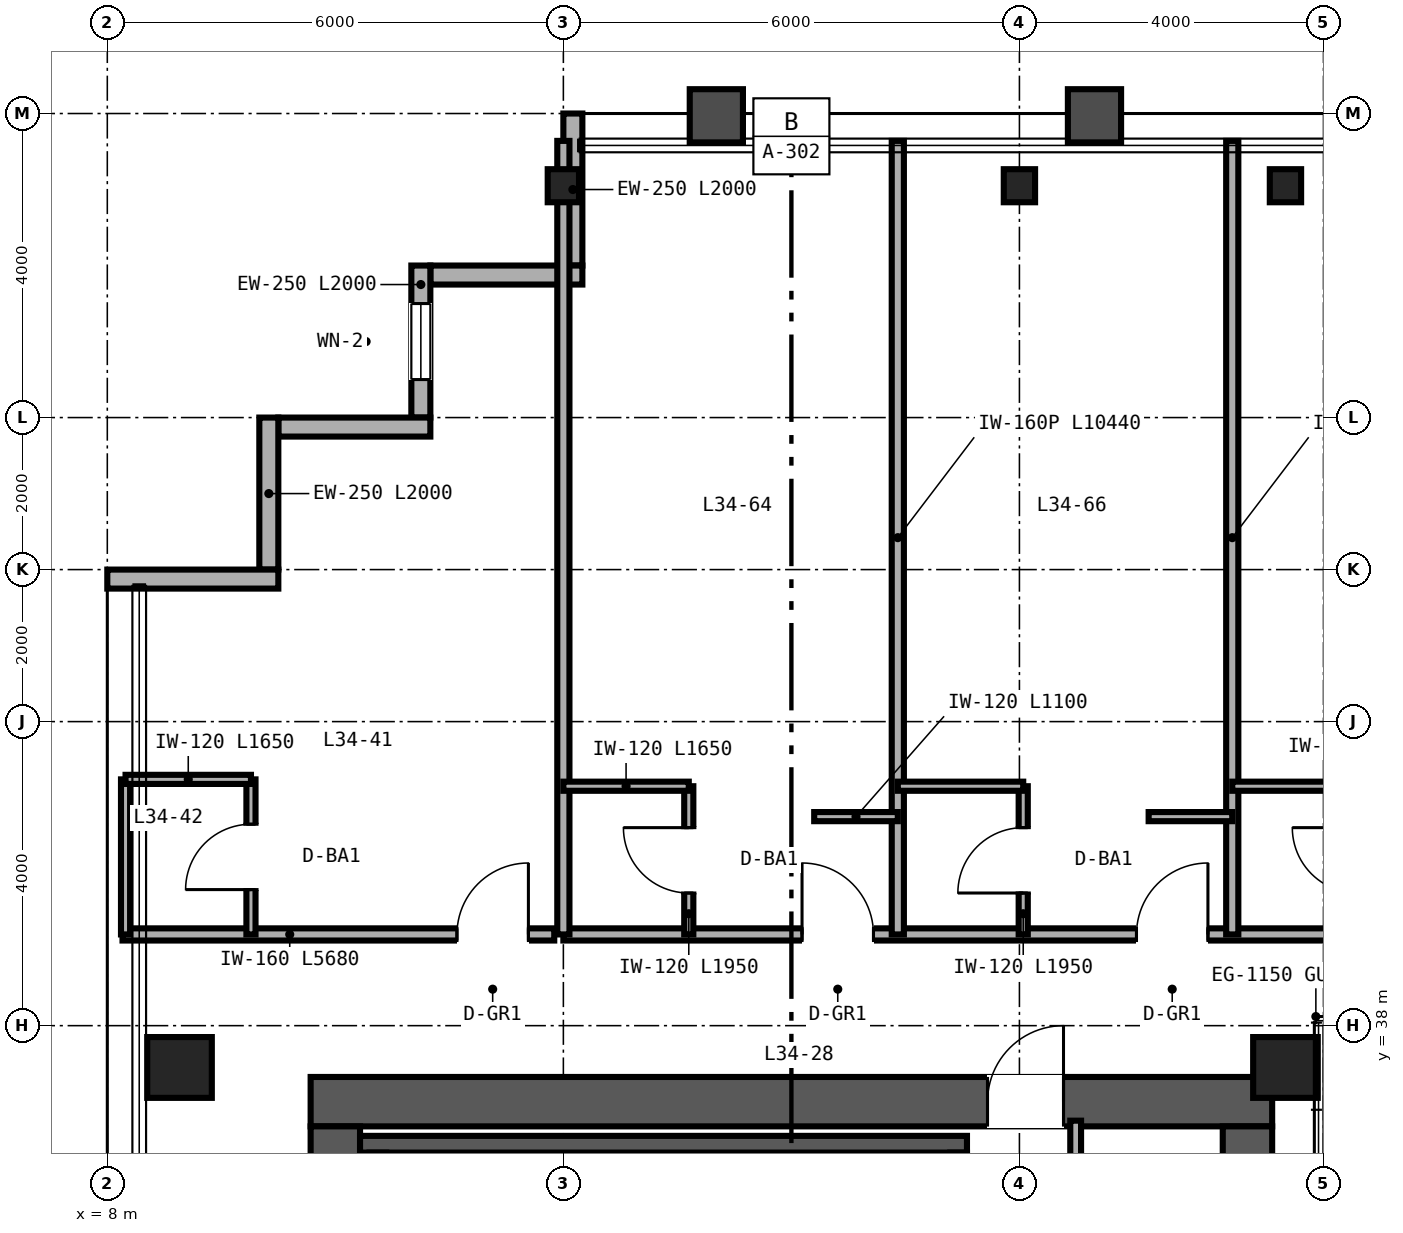
"""IFC4 building model, lengths in metres.
Left out: names, types, materials, properties, quantities, classifications, styles, units other than length and angle.
Written with IfcOpenShell. Run it as: python <this file> out.ifc"""

import sys

from ifc_helpers import new_model, si_unit, direction, frame, frame_2d, origin, origin_2d, place, context, subcontext, project, spatial, rectangle, hollow_rectangle, i_section, extrude, source, transform, mapped, element, fill, save


model = new_model("IFC4")
c1 = context("Model", 3, precision=1e-05, world=origin(), true_north=direction((0.0, 1.0)))
c2 = subcontext(c1, "Body", "Model", "MODEL_VIEW")
j1 = project(units=[si_unit("LENGTHUNIT", "METRE"), si_unit("PLANEANGLEUNIT", "RADIAN")], contexts=[c1])
p1 = place(None, origin())
s1 = spatial("IfcSite", under=j1, at=p1, CompositionType="ELEMENT")
p2 = place(p1, origin())
s2 = spatial("IfcBuilding", under=s1, at=p2, CompositionType="ELEMENT")
p3 = place(p2, frame((0.0, 0.0, 136.8)))
s3 = spatial("IfcBuildingStorey", under=s2, at=p3, CompositionType="ELEMENT", Elevation=136.8)
p4 = place(p3, frame((10.675, 37.0, 0.0), z_axis=(0.0, 0.0, 1.0), x_axis=(1.0, 0.0, 0.0)))
e1 = element("IfcWall", 1, at=p4, inside=s3, PredefinedType="SHEAR", context=c2, shape_type="SweptSolid", body=[
    extrude(rectangle(XDim=12.65, YDim=0.65, at=frame_2d((6.325, 0.0))), origin(), (0.0, 0.0, 1.0), 3.36),
])
p5 = place(p4, frame((8.905, 0.0, 0.0)))
e2 = element("IfcOpeningElement", 2, at=p5, cuts=e1, PredefinedType="OPENING", context=c2, shape_type="SweptSolid", body=[
    extrude(rectangle(XDim=1.0, YDim=2.15, at=frame_2d((0.5, 1.075))), frame((0.0, 0.335, 0.0), z_axis=(0.0, -1.0, 0.0), x_axis=(1.0, 0.0, 0.0)), (0.0, 0.0, 1.0), 0.67),
])
for number, where, z_axis, x_axis in (
    (3, (11.0, 15.325, 0.0), (0.0, 0.0, 1.0), (0.0, 1.0, 0.0)),
    (4, (23.0, 15.325, 0.0), (0.0, 0.0, 1.0), (0.0, 1.0, 0.0)),
):
    element("IfcWall", number, at=place(p3, frame(where, z_axis=z_axis, x_axis=x_axis)), inside=s3, PredefinedType="SHEAR", context=c2, shape_type="SweptSolid", body=[
        extrude(rectangle(XDim=21.35, YDim=0.65, at=frame_2d((10.675, 0.0))), origin(), (0.0, 0.0, 1.0), 3.36),
    ])
p6 = place(p3, frame((11.325, 36.44, 0.0), z_axis=(0.0, 0.0, 1.0), x_axis=(1.0, 0.0, 0.0)))
e5 = element("IfcWall", 5, at=p6, inside=s3, PredefinedType="SHEAR", context=c2, shape_type="SweptSolid", body=[
    extrude(rectangle(XDim=7.985, YDim=0.22, at=frame_2d((3.993, 0.0))), origin(), (0.0, 0.0, 1.0), 3.4),
])
for number, where, z_axis, x_axis in (
    (6, (11.56, 33.05, 0.0), (0.0, 0.0, 1.0), (0.0, 1.0, 0.0)),
    (7, (19.2, 33.05, 0.0), (0.0, 0.0, 1.0), (0.0, 1.0, 0.0)),
):
    element("IfcWall", number, at=place(p3, frame(where, z_axis=z_axis, x_axis=x_axis)), inside=s3, PredefinedType="SHEAR", context=c2, shape_type="SweptSolid", body=[
        extrude(rectangle(XDim=3.28, YDim=0.22, at=frame_2d((1.64, 0.0))), origin(), (0.0, 0.0, 1.0), 3.4),
    ])
m1 = source(origin(), c2, "Body", "SweptSolid", [
    extrude(hollow_rectangle(XDim=0.85, YDim=0.8, WallThickness=0.032, at=origin_2d()), origin(), (0.0, 0.0, 1.0), 3.36),
])
for number, where, z_axis, x_axis in (
    (8, (8.95, 37.45, 0.0), (0.0, 0.0, 1.0), (1.0, 0.0, 0.0)),
    (9, (23.5, 37.45, 0.0), (0.0, 0.0, 1.0), (1.0, 0.0, 0.0)),
):
    element("IfcColumn", number, at=place(p3, frame(where, z_axis=z_axis, x_axis=x_axis)), inside=s3, PredefinedType="COLUMN", context=c2, shape_type="MappedRepresentation", body=[
        mapped(m1, transform((0.0, 0.0, 0.0), scale=1.0)),
    ])
m2 = source(origin(), c2, "Body", "SweptSolid", [
    extrude(i_section(OverallWidth=0.412, OverallDepth=0.435, WebThickness=0.036, FlangeThickness=0.057, FilletRadius=0.025, at=origin_2d()), origin(), (0.0, 0.0, 1.0), 3.36),
])
for number, where, z_axis, x_axis in (
    (10, (14.0, 49.05, 0.0), (0.0, 0.0, 1.0), (1.0, 0.0, 0.0)),
    (11, (20.0, 49.05, 0.0), (0.0, 0.0, 1.0), (1.0, 0.0, 0.0)),
    (12, (23.5, 49.05, 0.0), (0.0, 0.0, 1.0), (1.0, 0.0, 0.0)),
):
    element("IfcColumn", number, at=place(p3, frame(where, z_axis=z_axis, x_axis=x_axis)), inside=s3, PredefinedType="COLUMN", context=c2, shape_type="MappedRepresentation", body=[
        mapped(m2, transform((0.0, 0.0, 0.0), scale=1.0)),
    ])
p7 = place(p3, frame((14.125, 50.0, 0.0), z_axis=(0.0, 0.0, 1.0), x_axis=(0.0, -1.0, 0.0)))
e13 = element("IfcWall", 13, at=p7, inside=s3, PredefinedType="SOLIDWALL", context=c2, shape_type="SweptSolid", body=[
    extrude(rectangle(XDim=2.0, YDim=0.25, at=frame_2d((1.0, 0.0))), origin(), (0.0, 0.0, 1.0), 2.667),
])
p8 = place(p3, frame((14.25, 47.875, 0.0), z_axis=(0.0, 0.0, 1.0), x_axis=(-1.0, 0.0, 0.0)))
e14 = element("IfcWall", 14, at=p8, inside=s3, PredefinedType="SOLIDWALL", context=c2, shape_type="SweptSolid", body=[
    extrude(rectangle(XDim=2.0, YDim=0.25, at=frame_2d((1.0, 0.0))), origin(), (0.0, 0.0, 1.0), 3.36),
])
p9 = place(p3, frame((12.125, 48.0, 0.0), z_axis=(0.0, 0.0, 1.0), x_axis=(0.0, -1.0, 0.0)))
e15 = element("IfcWall", 15, at=p9, inside=s3, PredefinedType="SOLIDWALL", context=c2, shape_type="SweptSolid", body=[
    extrude(rectangle(XDim=2.0, YDim=0.25, at=frame_2d((1.0, 0.0))), origin(), (0.0, 0.0, 1.0), 3.36),
])
p10 = place(p9, frame((0.5, 0.0, 0.85)))
e16 = element("IfcOpeningElement", 16, at=p10, cuts=e15, PredefinedType="OPENING", context=c2, shape_type="SweptSolid", body=[
    extrude(rectangle(XDim=1.0, YDim=1.9, at=frame_2d((0.5, 0.95))), frame((0.0, 0.135, 0.0), z_axis=(0.0, -1.0, 0.0), x_axis=(1.0, 0.0, 0.0)), (0.0, 0.0, 1.0), 0.27),
])
for number, where, z_axis, x_axis in (
    (17, (12.25, 45.875, 0.0), (0.0, 0.0, 1.0), (-1.0, 0.0, 0.0)),
    (18, (10.125, 46.0, 0.0), (0.0, 0.0, 1.0), (0.0, -1.0, 0.0)),
):
    element("IfcWall", number, at=place(p3, frame(where, z_axis=z_axis, x_axis=x_axis)), inside=s3, PredefinedType="SOLIDWALL", context=c2, shape_type="SweptSolid", body=[
        extrude(rectangle(XDim=2.0, YDim=0.25, at=frame_2d((1.0, 0.0))), origin(), (0.0, 0.0, 1.0), 3.36),
    ])
p11 = place(p3, frame((10.25, 43.875, 0.0), z_axis=(0.0, 0.0, 1.0), x_axis=(-1.0, 0.0, 0.0)))
e19 = element("IfcWall", 19, at=p11, inside=s3, PredefinedType="SOLIDWALL", context=c2, shape_type="SweptSolid", body=[
    extrude(rectangle(XDim=2.25, YDim=0.25, at=frame_2d((1.125, 0.0))), origin(), (0.0, 0.0, 1.0), 3.36),
])
p12 = place(p3, frame((20.74, 34.92, 0.0), z_axis=(0.0, 0.0, 1.0), x_axis=(0.0, 1.0, 0.0)))
e20 = element("IfcWall", 20, at=p12, inside=s3, PredefinedType="PARTITIONING", context=c2, shape_type="SweptSolid", body=[
    extrude(rectangle(XDim=1.83, YDim=0.142, at=frame_2d((0.915, 0.0))), origin(), (0.0, 0.0, 1.0), 3.36),
])
p13 = place(p3, frame((8.2, 39.2, 0.0), z_axis=(0.0, 0.0, 1.0), x_axis=(1.0, 0.0, 0.0)))
e21 = element("IfcWall", 21, at=p13, inside=s3, PredefinedType="PARTITIONING", context=c2, shape_type="SweptSolid", body=[
    extrude(rectangle(XDim=5.68, YDim=0.16, at=frame_2d((2.84, 0.0))), origin(), (0.0, 0.0, 1.0), 3.36),
])
p14 = place(p13, frame((4.4, 0.0, 0.0)))
e22 = element("IfcOpeningElement", 22, at=p14, cuts=e21, PredefinedType="OPENING", context=c2, shape_type="SweptSolid", body=[
    extrude(rectangle(XDim=0.94, YDim=2.15, at=frame_2d((0.47, 1.075))), frame((0.0, 0.09, 0.0), z_axis=(0.0, -1.0, 0.0), x_axis=(1.0, 0.0, 0.0)), (0.0, 0.0, 1.0), 0.18),
])
p15 = place(p3, frame((9.89, 39.2, 0.0), z_axis=(0.0, 0.0, 1.0), x_axis=(0.0, 1.0, 0.0)))
e23 = element("IfcWall", 23, at=p15, inside=s3, PredefinedType="PARTITIONING", context=c2, shape_type="SweptSolid", body=[
    extrude(rectangle(XDim=2.04, YDim=0.12, at=frame_2d((1.02, 0.0))), origin(), (0.0, 0.0, 1.0), 3.36),
])
p16 = place(p15, frame((0.59, 0.0, 0.0)))
e24 = element("IfcOpeningElement", 24, at=p16, cuts=e23, PredefinedType="OPENING", context=c2, shape_type="SweptSolid", body=[
    extrude(rectangle(XDim=0.86, YDim=2.1, at=frame_2d((0.43, 1.05))), frame((0.0, 0.07, 0.0), z_axis=(0.0, -1.0, 0.0), x_axis=(1.0, 0.0, 0.0)), (0.0, 0.0, 1.0), 0.14),
])
p17 = place(p3, frame((8.24, 39.2, 0.0), z_axis=(0.0, 0.0, 1.0), x_axis=(0.0, 1.0, 0.0)))
e25 = element("IfcWall", 25, at=p17, inside=s3, PredefinedType="PARTITIONING", context=c2, shape_type="SweptSolid", body=[
    extrude(rectangle(XDim=2.04, YDim=0.12, at=frame_2d((1.02, 0.0))), origin(), (0.0, 0.0, 1.0), 3.36),
])
p18 = place(p3, frame((8.24, 41.24, 0.0), z_axis=(0.0, 0.0, 1.0), x_axis=(1.0, 0.0, 0.0)))
e26 = element("IfcWall", 26, at=p18, inside=s3, PredefinedType="PARTITIONING", context=c2, shape_type="SweptSolid", body=[
    extrude(rectangle(XDim=1.65, YDim=0.12, at=frame_2d((0.825, 0.0))), origin(), (0.0, 0.0, 1.0), 3.36),
])
p19 = place(p3, frame((14.0, 39.2, 0.0), z_axis=(0.0, 0.0, 1.0), x_axis=(1.0, 0.0, 0.0)))
e27 = element("IfcWall", 27, at=p19, inside=s3, PredefinedType="PARTITIONING", context=c2, shape_type="SweptSolid", body=[
    extrude(rectangle(XDim=36.0, YDim=0.16, at=frame_2d((18.0, 0.0))), origin(), (0.0, 0.0, 1.0), 2.581),
])
p20 = place(p19, frame((3.14, 0.0, 0.0)))
e28 = element("IfcOpeningElement", 28, at=p20, cuts=e27, PredefinedType="OPENING", context=c2, shape_type="SweptSolid", body=[
    extrude(rectangle(XDim=0.94, YDim=2.15, at=frame_2d((0.47, 1.075))), frame((0.0, 0.09, 0.0), z_axis=(0.0, -1.0, 0.0), x_axis=(1.0, 0.0, 0.0)), (0.0, 0.0, 1.0), 0.18),
])
p21 = place(p19, frame((7.54, 0.0, 0.0)))
e29 = element("IfcOpeningElement", 29, at=p21, cuts=e27, PredefinedType="OPENING", context=c2, shape_type="SweptSolid", body=[
    extrude(rectangle(XDim=0.94, YDim=2.15, at=frame_2d((0.47, 1.075))), frame((0.0, 0.09, 0.0), z_axis=(0.0, -1.0, 0.0), x_axis=(1.0, 0.0, 0.0)), (0.0, 0.0, 1.0), 0.18),
])
p22 = place(p19, frame((11.94, 0.0, 0.0)))
e30 = element("IfcOpeningElement", 30, at=p22, cuts=e27, PredefinedType="OPENING", context=c2, shape_type="SweptSolid", body=[
    extrude(rectangle(XDim=0.94, YDim=2.15, at=frame_2d((0.47, 1.075))), frame((0.0, 0.09, 0.0), z_axis=(0.0, -1.0, 0.0), x_axis=(1.0, 0.0, 0.0)), (0.0, 0.0, 1.0), 0.18),
])
p23 = place(p19, frame((15.02, 0.0, 0.0)))
e31 = element("IfcOpeningElement", 31, at=p23, cuts=e27, PredefinedType="OPENING", context=c2, shape_type="SweptSolid", body=[
    extrude(rectangle(XDim=0.96, YDim=2.15, at=frame_2d((0.48, 1.075))), frame((0.0, 0.09, 0.0), z_axis=(0.0, -1.0, 0.0), x_axis=(1.0, 0.0, 0.0)), (0.0, 0.0, 1.0), 0.18),
])
p24 = place(p19, frame((21.14, 0.0, 0.0)))
e32 = element("IfcOpeningElement", 32, at=p24, cuts=e27, PredefinedType="OPENING", context=c2, shape_type="SweptSolid", body=[
    extrude(rectangle(XDim=0.94, YDim=2.15, at=frame_2d((0.47, 1.075))), frame((0.0, 0.09, 0.0), z_axis=(0.0, -1.0, 0.0), x_axis=(1.0, 0.0, 0.0)), (0.0, 0.0, 1.0), 0.18),
])
p25 = place(p19, frame((24.79, 0.0, 0.0)))
e33 = element("IfcOpeningElement", 33, at=p25, cuts=e27, PredefinedType="OPENING", context=c2, shape_type="SweptSolid", body=[
    extrude(rectangle(XDim=0.94, YDim=2.15, at=frame_2d((0.47, 1.075))), frame((0.0, 0.09, 0.0), z_axis=(0.0, -1.0, 0.0), x_axis=(1.0, 0.0, 0.0)), (0.0, 0.0, 1.0), 0.18),
])
p26 = place(p19, frame((30.24, 0.0, 0.0)))
e34 = element("IfcOpeningElement", 34, at=p26, cuts=e27, PredefinedType="OPENING", context=c2, shape_type="SweptSolid", body=[
    extrude(rectangle(XDim=0.94, YDim=2.15, at=frame_2d((0.47, 1.075))), frame((0.0, 0.09, 0.0), z_axis=(0.0, -1.0, 0.0), x_axis=(1.0, 0.0, 0.0)), (0.0, 0.0, 1.0), 0.18),
])
p27 = place(p19, frame((34.74, 0.0, 0.0)))
e35 = element("IfcOpeningElement", 35, at=p27, cuts=e27, PredefinedType="OPENING", context=c2, shape_type="SweptSolid", body=[
    extrude(rectangle(XDim=0.94, YDim=2.15, at=frame_2d((0.47, 1.075))), frame((0.0, 0.09, 0.0), z_axis=(0.0, -1.0, 0.0), x_axis=(1.0, 0.0, 0.0)), (0.0, 0.0, 1.0), 0.18),
])
for number, where, z_axis, x_axis in (
    (36, (14.0, 39.2, 0.0), (0.0, 0.0, 1.0), (0.0, 1.0, 0.0)),
    (37, (18.4, 39.2, 0.0), (0.0, 0.0, 1.0), (0.0, 1.0, 0.0)),
):
    element("IfcWall", number, at=place(p3, frame(where, z_axis=z_axis, x_axis=x_axis)), inside=s3, PredefinedType="PARTITIONING", context=c2, shape_type="SweptSolid", body=[
        extrude(rectangle(XDim=10.44, YDim=0.16, at=frame_2d((5.22, 0.0))), origin(), (0.0, 0.0, 1.0), 2.667),
    ])
p28 = place(p3, frame((15.65, 39.2, 0.0), z_axis=(0.0, 0.0, 1.0), x_axis=(0.0, 1.0, 0.0)))
e38 = element("IfcWall", 38, at=p28, inside=s3, PredefinedType="PARTITIONING", context=c2, shape_type="SweptSolid", body=[
    extrude(rectangle(XDim=1.95, YDim=0.12, at=frame_2d((0.975, 0.0))), origin(), (0.0, 0.0, 1.0), 3.36),
])
p29 = place(p28, frame((0.545, 0.0, 0.0)))
e39 = element("IfcOpeningElement", 39, at=p29, cuts=e38, PredefinedType="OPENING", context=c2, shape_type="SweptSolid", body=[
    extrude(rectangle(XDim=0.86, YDim=2.1, at=frame_2d((0.43, 1.05))), frame((0.0, 0.07, 0.0), z_axis=(0.0, -1.0, 0.0), x_axis=(1.0, 0.0, 0.0)), (0.0, 0.0, 1.0), 0.14),
])
p30 = place(p3, frame((14.0, 41.15, 0.0), z_axis=(0.0, 0.0, 1.0), x_axis=(1.0, 0.0, 0.0)))
e40 = element("IfcWall", 40, at=p30, inside=s3, PredefinedType="PARTITIONING", context=c2, shape_type="SweptSolid", body=[
    extrude(rectangle(XDim=1.65, YDim=0.12, at=frame_2d((0.825, 0.0))), origin(), (0.0, 0.0, 1.0), 3.36),
])
p31 = place(p3, frame((17.3, 40.75, 0.0), z_axis=(0.0, 0.0, 1.0), x_axis=(1.0, 0.0, 0.0)))
e41 = element("IfcWall", 41, at=p31, inside=s3, PredefinedType="PARTITIONING", context=c2, shape_type="SweptSolid", body=[
    extrude(rectangle(XDim=1.1, YDim=0.12, at=frame_2d((0.55, 0.0))), origin(), (0.0, 0.0, 1.0), 3.36),
])
p32 = place(p3, frame((22.8, 39.2, 0.0), z_axis=(0.0, 0.0, 1.0), x_axis=(0.0, 1.0, 0.0)))
e42 = element("IfcWall", 42, at=p32, inside=s3, PredefinedType="PARTITIONING", context=c2, shape_type="SweptSolid", body=[
    extrude(rectangle(XDim=10.44, YDim=0.16, at=frame_2d((5.22, 0.0))), origin(), (0.0, 0.0, 1.0), 2.823),
])
p33 = place(p3, frame((20.05, 39.2, 0.0), z_axis=(0.0, 0.0, 1.0), x_axis=(0.0, 1.0, 0.0)))
e43 = element("IfcWall", 43, at=p33, inside=s3, PredefinedType="PARTITIONING", context=c2, shape_type="SweptSolid", body=[
    extrude(rectangle(XDim=1.95, YDim=0.12, at=frame_2d((0.975, 0.0))), origin(), (0.0, 0.0, 1.0), 3.36),
])
p34 = place(p33, frame((0.545, 0.0, 0.0)))
e44 = element("IfcOpeningElement", 44, at=p34, cuts=e43, PredefinedType="OPENING", context=c2, shape_type="SweptSolid", body=[
    extrude(rectangle(XDim=0.86, YDim=2.1, at=frame_2d((0.43, 1.05))), frame((0.0, 0.07, 0.0), z_axis=(0.0, -1.0, 0.0), x_axis=(1.0, 0.0, 0.0)), (0.0, 0.0, 1.0), 0.14),
])
p35 = place(p3, frame((18.4, 41.15, 0.0), z_axis=(0.0, 0.0, 1.0), x_axis=(1.0, 0.0, 0.0)))
e45 = element("IfcWall", 45, at=p35, inside=s3, PredefinedType="PARTITIONING", context=c2, shape_type="SweptSolid", body=[
    extrude(rectangle(XDim=1.65, YDim=0.12, at=frame_2d((0.825, 0.0))), origin(), (0.0, 0.0, 1.0), 3.36),
])
p36 = place(p3, frame((21.7, 40.75, 0.0), z_axis=(0.0, 0.0, 1.0), x_axis=(1.0, 0.0, 0.0)))
e46 = element("IfcWall", 46, at=p36, inside=s3, PredefinedType="PARTITIONING", context=c2, shape_type="SweptSolid", body=[
    extrude(rectangle(XDim=1.1, YDim=0.12, at=frame_2d((0.55, 0.0))), origin(), (0.0, 0.0, 1.0), 3.36),
])
p37 = place(p3, frame((22.8, 41.15, 0.0), z_axis=(0.0, 0.0, 1.0), x_axis=(1.0, 0.0, 0.0)))
e47 = element("IfcWall", 47, at=p37, inside=s3, PredefinedType="PARTITIONING", context=c2, shape_type="SweptSolid", body=[
    extrude(rectangle(XDim=1.65, YDim=0.12, at=frame_2d((0.825, 0.0))), origin(), (0.0, 0.0, 1.0), 2.581),
])
m3 = source(origin(), c2, "Body", "SweptSolid", [
    extrude(rectangle(XDim=1.0, YDim=1.9, at=frame_2d((0.5, 0.95))), frame((0.0, 0.03, 0.0), z_axis=(0.0, -1.0, 0.0), x_axis=(1.0, 0.0, 0.0)), (0.0, 0.0, 1.0), 0.06),
])
p38 = place(p10, origin())
e48 = element("IfcWindow", 48, at=p38, inside=s3, PartitioningType="SINGLE_PANEL", PredefinedType="WINDOW", context=c2, shape_type="MappedRepresentation", body=[
    mapped(m3, transform((0.0, 0.0, 0.0), scale=1.0)),
])
fill(e16, e48)
m4 = source(origin(), c2, "Body", "SweptSolid", [
    extrude(rectangle(XDim=1.0, YDim=2.15, at=frame_2d((0.5, 1.075))), frame((0.0, 0.025, 0.0), z_axis=(0.0, -1.0, 0.0), x_axis=(1.0, 0.0, 0.0)), (0.0, 0.0, 1.0), 0.05),
])
p39 = place(p5, origin())
e49 = element("IfcDoor", 49, at=p39, inside=s3, OperationType="SINGLE_SWING_RIGHT", PredefinedType="DOOR", context=c2, shape_type="MappedRepresentation", body=[
    mapped(m4, transform((0.0, 0.0, 0.0), scale=1.0)),
])
fill(e2, e49)
m5 = source(origin(), c2, "Body", "SweptSolid", [
    extrude(rectangle(XDim=0.86, YDim=2.1, at=frame_2d((0.43, 1.05))), frame((0.0, 0.025, 0.0), z_axis=(0.0, -1.0, 0.0), x_axis=(1.0, 0.0, 0.0)), (0.0, 0.0, 1.0), 0.05),
])
p40 = place(p16, origin())
e50 = element("IfcDoor", 50, at=p40, inside=s3, OperationType="SINGLE_SWING_LEFT", PredefinedType="DOOR", context=c2, shape_type="MappedRepresentation", body=[
    mapped(m5, transform((0.0, 0.0, 0.0), scale=1.0)),
])
fill(e24, e50)
m6 = source(origin(), c2, "Body", "SweptSolid", [
    extrude(rectangle(XDim=0.94, YDim=2.15, at=frame_2d((0.47, 1.075))), frame((0.0, 0.025, 0.0), z_axis=(0.0, -1.0, 0.0), x_axis=(1.0, 0.0, 0.0)), (0.0, 0.0, 1.0), 0.05),
])
p41 = place(p14, origin())
e51 = element("IfcDoor", 51, at=p41, inside=s3, OperationType="SINGLE_SWING_RIGHT", PredefinedType="DOOR", context=c2, shape_type="MappedRepresentation", body=[
    mapped(m6, transform((0.0, 0.0, 0.0), scale=1.0)),
])
fill(e22, e51)
p42 = place(p29, origin())
e52 = element("IfcDoor", 52, at=p42, inside=s3, OperationType="SINGLE_SWING_RIGHT", PredefinedType="DOOR", context=c2, shape_type="MappedRepresentation", body=[
    mapped(m5, transform((0.0, 0.0, 0.0), scale=1.0)),
])
fill(e39, e52)
p43 = place(p34, origin())
e53 = element("IfcDoor", 53, at=p43, inside=s3, OperationType="SINGLE_SWING_LEFT", PredefinedType="DOOR", context=c2, shape_type="MappedRepresentation", body=[
    mapped(m5, transform((0.0, 0.0, 0.0), scale=1.0)),
])
fill(e44, e53)
p44 = place(p20, origin())
e54 = element("IfcDoor", 54, at=p44, inside=s3, OperationType="SINGLE_SWING_LEFT", PredefinedType="DOOR", context=c2, shape_type="MappedRepresentation", body=[
    mapped(m6, transform((0.0, 0.0, 0.0), scale=1.0)),
])
fill(e28, e54)
p45 = place(p21, origin())
e55 = element("IfcDoor", 55, at=p45, inside=s3, OperationType="SINGLE_SWING_RIGHT", PredefinedType="DOOR", context=c2, shape_type="MappedRepresentation", body=[
    mapped(m6, transform((0.0, 0.0, 0.0), scale=1.0)),
])
fill(e29, e55)
save(model, sys.argv[1])
